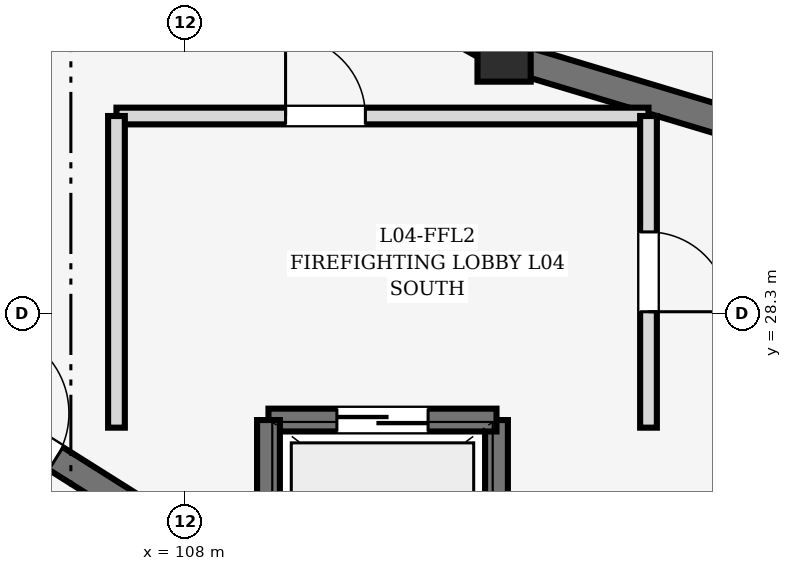
"""IFC4 building model, lengths in metres.
Left out: names, types, materials, properties, quantities, classifications, styles, units other than length and angle.
Written with IfcOpenShell. Run it as: python <this file> out.ifc"""

import sys

from ifc_helpers import new_model, si_unit, direction, frame, frame_2d, origin, origin_2d, place, context, subcontext, project, spatial, rectangle, extrude, element, fill, save


model = new_model("IFC4")
c1 = context("Model", 3, precision=1e-05, world=origin(), true_north=direction((0.0, 1.0)))
c2 = subcontext(c1, "Body", "Model", "MODEL_VIEW")
j1 = project(units=[si_unit("LENGTHUNIT", "METRE"), si_unit("PLANEANGLEUNIT", "RADIAN")], contexts=[c1])
p1 = place(None, origin())
s1 = spatial("IfcSite", under=j1, at=p1, CompositionType="ELEMENT")
p2 = place(p1, origin())
s2 = spatial("IfcBuilding", under=s1, at=p2, CompositionType="ELEMENT")
p3 = place(p2, frame((0.0, 0.0, 14.7)))
s3 = spatial("IfcBuildingStorey", under=s2, at=p3, CompositionType="ELEMENT", Elevation=14.7)
p4 = place(p3, frame((112.2, 31.702, 0.0), z_axis=(0.0, 0.0, 1.0), x_axis=(1.0, 0.0, 0.0)))
e1 = element("IfcColumn", 1, at=p4, inside=s3, PredefinedType="COLUMN", context=c2, shape_type="SweptSolid", body=[
    extrude(rectangle(XDim=0.7, YDim=0.7, at=origin_2d()), origin(), (0.0, 0.0, 1.0), 4.5),
])
p5 = place(p3, frame((108.39, 33.821, 0.0), z_axis=(0.0, 0.0, 1.0), x_axis=(0.87401308715, -0.485902380618, 0.0)))
e2 = element("IfcWall", 2, at=p5, inside=s3, PredefinedType="SOLIDWALL", context=c2, shape_type="SweptSolid", body=[
    extrude(rectangle(XDim=4.074, YDim=0.38, at=frame_2d((2.037, 0.0))), origin(), (0.0, 0.0, 1.0), 4.25),
])
p6 = place(p5, frame((1.507, 0.0, 0.0)))
e3 = element("IfcOpeningElement", 3, at=p6, cuts=e2, PredefinedType="OPENING", context=c2, shape_type="SweptSolid", body=[
    extrude(rectangle(XDim=1.06, YDim=2.24, at=frame_2d((0.53, 1.12))), frame((0.0, 0.202, 0.0), z_axis=(0.0, -1.0, 0.0), x_axis=(1.0, 0.0, 0.0)), (0.0, 0.0, 1.0), 0.404),
])
p7 = place(p3, frame((103.312, 28.279, 0.0), z_axis=(0.0, 0.0, 1.0), x_axis=(0.846132783073, -0.532972150688, 0.0)))
e4 = element("IfcWall", 4, at=p7, inside=s3, PredefinedType="SHEAR", context=c2, shape_type="SweptSolid", body=[
    extrude(rectangle(XDim=5.95, YDim=0.35, at=frame_2d((2.975, 0.0))), origin(), (0.0, 0.0, 1.0), 4.25),
])
p8 = place(p7, frame((2.415, 0.0, 0.0)))
e5 = element("IfcOpeningElement", 5, at=p8, cuts=e4, PredefinedType="OPENING", context=c2, shape_type="SweptSolid", body=[
    extrude(rectangle(XDim=1.12, YDim=2.26, at=frame_2d((0.56, 1.13))), frame((0.0, 0.187, 0.0), z_axis=(0.0, -1.0, 0.0), x_axis=(1.0, 0.0, 0.0)), (0.0, 0.0, 1.0), 0.374),
])
p9 = place(p3, frame((112.473, 31.621, 0.0), z_axis=(0.0, 0.0, 1.0), x_axis=(0.957792414988, -0.287460762177, 0.0)))
e6 = element("IfcWall", 6, at=p9, inside=s3, PredefinedType="SOLIDWALL", context=c2, shape_type="SweptSolid", body=[
    extrude(rectangle(XDim=4.365, YDim=0.38, at=frame_2d((2.183, 0.0))), origin(), (0.0, 0.0, 1.0), 4.25),
])
p10 = place(p3, frame((112.1, 26.9, 0.0), z_axis=(0.0, 0.0, 1.0), x_axis=(0.0, -1.0, 0.0)))
e7 = element("IfcWall", 7, at=p10, inside=s3, PredefinedType="SHEAR", context=c2, shape_type="SweptSolid", body=[
    extrude(rectangle(XDim=2.2, YDim=0.3, at=frame_2d((1.1, 0.0))), origin(), (0.0, 0.0, 1.0), 4.25),
])
p11 = place(p3, frame((109.1, 26.9, 0.0), z_axis=(0.0, 0.0, 1.0), x_axis=(1.0, 0.0, 0.0)))
e8 = element("IfcWall", 8, at=p11, inside=s3, PredefinedType="SHEAR", context=c2, shape_type="SweptSolid", body=[
    extrude(rectangle(XDim=3.0, YDim=0.3, at=frame_2d((1.5, 0.0))), origin(), (0.0, 0.0, 1.0), 4.25),
])
p12 = place(p11, frame((0.9, 0.0, 0.0)))
e9 = element("IfcOpeningElement", 9, at=p12, cuts=e8, PredefinedType="OPENING", context=c2, shape_type="SweptSolid", body=[
    extrude(rectangle(XDim=1.2, YDim=2.15, at=frame_2d((0.6, 1.075))), frame((0.0, 0.162, 0.0), z_axis=(0.0, -1.0, 0.0), x_axis=(1.0, 0.0, 0.0)), (0.0, 0.0, 1.0), 0.324),
])
p13 = place(p3, frame((109.1, 24.7, 0.0), z_axis=(0.0, 0.0, 1.0), x_axis=(0.0, 1.0, 0.0)))
e10 = element("IfcWall", 10, at=p13, inside=s3, PredefinedType="SHEAR", context=c2, shape_type="SweptSolid", body=[
    extrude(rectangle(XDim=2.2, YDim=0.3, at=frame_2d((1.1, 0.0))), origin(), (0.0, 0.0, 1.0), 4.25),
])
p14 = place(p3, frame((107.1, 30.9, 0.0), z_axis=(0.0, 0.0, 1.0), x_axis=(1.0, 0.0, 0.0)))
e11 = element("IfcWall", 11, at=p14, inside=s3, PredefinedType="SOLIDWALL", context=c2, shape_type="SweptSolid", body=[
    extrude(rectangle(XDim=7.0, YDim=0.22, at=frame_2d((3.5, 0.0))), origin(), (0.0, 0.0, 1.0), 4.235),
])
p15 = place(p14, frame((2.225, 0.0, 0.0)))
e12 = element("IfcOpeningElement", 12, at=p15, cuts=e11, PredefinedType="OPENING", context=c2, shape_type="SweptSolid", body=[
    extrude(rectangle(XDim=1.05, YDim=2.15, at=frame_2d((0.525, 1.075))), frame((0.0, 0.122, 0.0), z_axis=(0.0, -1.0, 0.0), x_axis=(1.0, 0.0, 0.0)), (0.0, 0.0, 1.0), 0.244),
])
p16 = place(p3, frame((107.1, 26.8, 0.0), z_axis=(0.0, 0.0, 1.0), x_axis=(0.0, 1.0, 0.0)))
e13 = element("IfcWall", 13, at=p16, inside=s3, PredefinedType="SOLIDWALL", context=c2, shape_type="SweptSolid", body=[
    extrude(rectangle(XDim=4.1, YDim=0.22, at=frame_2d((2.05, 0.0))), origin(), (0.0, 0.0, 1.0), 4.235),
])
p17 = place(p3, frame((114.1, 30.9, 0.0), z_axis=(0.0, 0.0, 1.0), x_axis=(0.0, -1.0, 0.0)))
e14 = element("IfcWall", 14, at=p17, inside=s3, PredefinedType="SOLIDWALL", context=c2, shape_type="SweptSolid", body=[
    extrude(rectangle(XDim=4.1, YDim=0.22, at=frame_2d((2.05, 0.0))), origin(), (0.0, 0.0, 1.0), 4.235),
])
p18 = place(p17, frame((1.525, 0.0, 0.0)))
e15 = element("IfcOpeningElement", 15, at=p18, cuts=e14, PredefinedType="OPENING", context=c2, shape_type="SweptSolid", body=[
    extrude(rectangle(XDim=1.05, YDim=2.15, at=frame_2d((0.525, 1.075))), frame((0.0, 0.122, 0.0), z_axis=(0.0, -1.0, 0.0), x_axis=(1.0, 0.0, 0.0)), (0.0, 0.0, 1.0), 0.244),
])
p19 = place(p12, origin())
e16 = element("IfcDoor", 16, at=p19, inside=s3, OperationType="DOUBLE_DOOR_SLIDING", PredefinedType="DOOR", context=c2, shape_type="SweptSolid", body=[
    extrude(rectangle(XDim=1.2, YDim=2.15, at=frame_2d((0.6, 1.075))), frame((0.0, 0.025, 0.0), z_axis=(0.0, -1.0, 0.0), x_axis=(1.0, 0.0, 0.0)), (0.0, 0.0, 1.0), 0.05),
])
fill(e9, e16)
p20 = place(p15, origin())
e17 = element("IfcDoor", 17, at=p20, inside=s3, OperationType="SINGLE_SWING_LEFT", PredefinedType="DOOR", context=c2, shape_type="SweptSolid", body=[
    extrude(rectangle(XDim=1.05, YDim=2.15, at=frame_2d((0.525, 1.075))), frame((0.0, 0.025, 0.0), z_axis=(0.0, -1.0, 0.0), x_axis=(1.0, 0.0, 0.0)), (0.0, 0.0, 1.0), 0.05),
])
fill(e12, e17)
p21 = place(p18, origin())
e18 = element("IfcDoor", 18, at=p21, inside=s3, OperationType="SINGLE_SWING_RIGHT", PredefinedType="DOOR", context=c2, shape_type="SweptSolid", body=[
    extrude(rectangle(XDim=1.05, YDim=2.15, at=frame_2d((0.525, 1.075))), frame((0.0, 0.025, 0.0), z_axis=(0.0, -1.0, 0.0), x_axis=(1.0, 0.0, 0.0)), (0.0, 0.0, 1.0), 0.05),
])
fill(e15, e18)
p22 = place(p8, origin())
e19 = element("IfcDoor", 19, at=p22, inside=s3, OperationType="SINGLE_SWING_LEFT", PredefinedType="DOOR", context=c2, shape_type="SweptSolid", body=[
    extrude(rectangle(XDim=1.12, YDim=2.26, at=frame_2d((0.56, 1.13))), frame((0.0, 0.025, 0.0), z_axis=(0.0, -1.0, 0.0), x_axis=(1.0, 0.0, 0.0)), (0.0, 0.0, 1.0), 0.05),
])
fill(e5, e19)
save(model, sys.argv[1])
